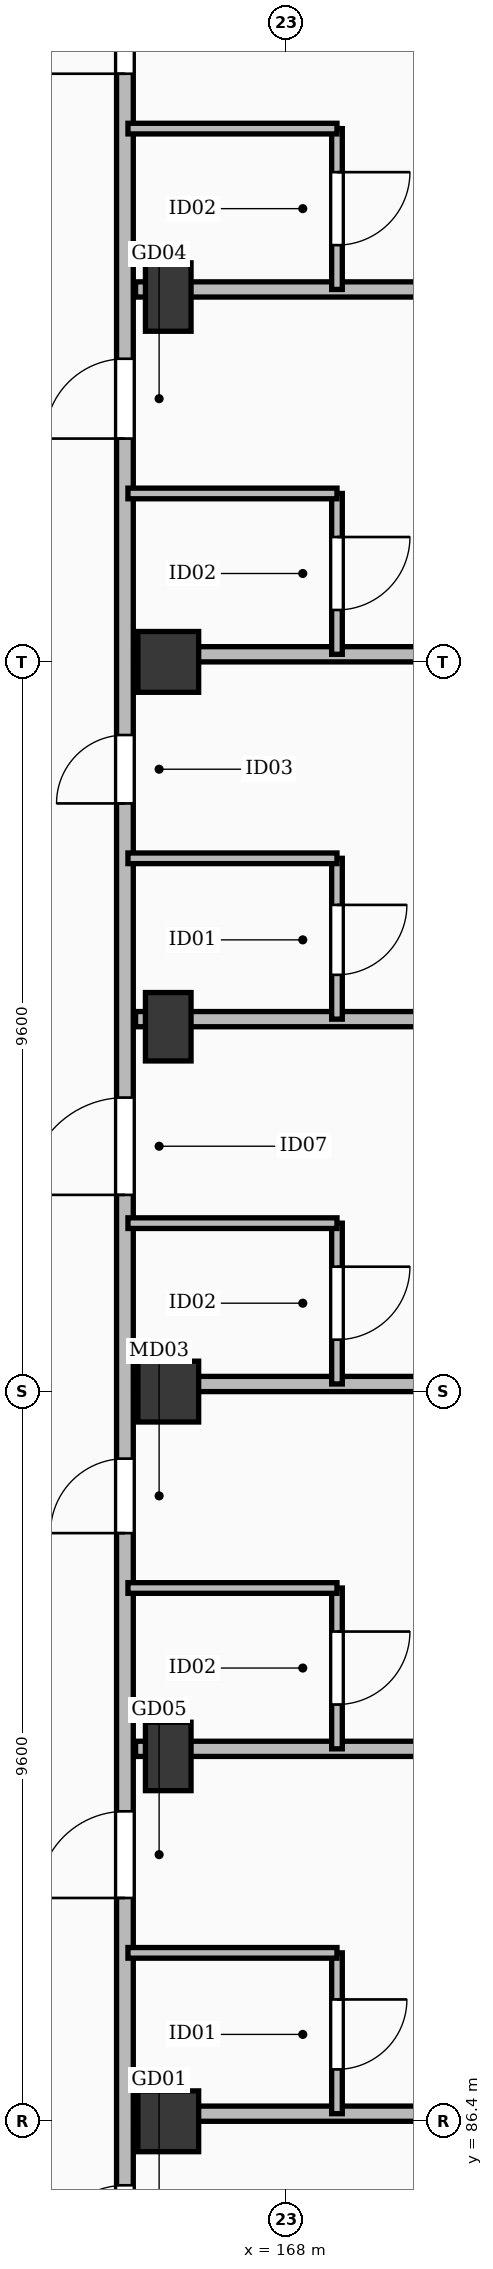
"""IFC4 building model, lengths in metres.
Left out: names, types, materials, properties, quantities, classifications, styles, units other than length and angle.
Written with IfcOpenShell. Run it as: python <this file> out.ifc"""

import sys

from ifc_helpers import new_model, si_unit, direction, frame, frame_2d, origin, origin_2d, place, context, subcontext, project, spatial, rectangle, extrude, element, fill, save


model = new_model("IFC4")
c1 = context("Model", 3, precision=1e-05, world=origin(), true_north=direction((0.0, 1.0)))
c2 = subcontext(c1, "Body", "Model", "MODEL_VIEW")
j1 = project(units=[si_unit("LENGTHUNIT", "METRE"), si_unit("PLANEANGLEUNIT", "RADIAN")], contexts=[c1])
p1 = place(None, origin())
s1 = spatial("IfcSite", under=j1, at=p1, CompositionType="ELEMENT")
p2 = place(p1, origin())
s2 = spatial("IfcBuilding", under=s1, at=p2, CompositionType="ELEMENT")
p3 = place(p2, frame((0.0, 0.0, 21.0)))
s3 = spatial("IfcBuildingStorey", under=s2, at=p3, CompositionType="ELEMENT", Elevation=21.0)
for number, where, z_axis, x_axis in (
    (1, (166.45, 86.4, 0.0), (0.0, 0.0, 1.0), (1.0, 0.0, 0.0)),
    (2, (166.45, 96.0, 0.0), (0.0, 0.0, 1.0), (1.0, 0.0, 0.0)),
    (3, (166.45, 105.6, 0.0), (0.0, 0.0, 1.0), (1.0, 0.0, 0.0)),
):
    element("IfcColumn", number, at=place(p3, frame(where, z_axis=z_axis, x_axis=x_axis)), inside=s3, PredefinedType="COLUMN", context=c2, shape_type="SweptSolid", body=[
        extrude(rectangle(XDim=0.8, YDim=0.8, at=origin_2d()), origin(), (0.0, 0.0, 1.0), 3.6),
    ])
for number, where, z_axis, x_axis in (
    (4, (166.45, 91.2, -0.26), (0.0, 0.0, 1.0), (1.0, 0.0, 0.0)),
    (5, (166.45, 100.8, -0.26), (0.0, 0.0, 1.0), (1.0, 0.0, 0.0)),
    (6, (166.45, 110.4, -0.26), (0.0, 0.0, 1.0), (1.0, 0.0, 0.0)),
):
    element("IfcColumn", number, at=place(p3, frame(where, z_axis=z_axis, x_axis=x_axis)), inside=s3, PredefinedType="COLUMN", context=c2, shape_type="SweptSolid", body=[
        extrude(rectangle(XDim=0.6, YDim=0.9, at=origin_2d()), origin(), (0.0, 0.0, 1.0), 3.86),
    ])
p4 = place(p3, frame((165.88, 65.4, 0.0), z_axis=(0.0, 0.0, 1.0), x_axis=(0.0, 1.0, 0.0)))
e7 = element("IfcWall", 7, at=p4, inside=s3, PredefinedType="PARTITIONING", context=c2, shape_type="SweptSolid", body=[
    extrude(rectangle(XDim=60.25, YDim=0.22, at=frame_2d((30.125, 0.0))), origin(), (0.0, 0.0, 1.0), 2.582),
])
p5 = place(p4, frame((4.388, 0.0, 0.0)))
e8 = element("IfcOpeningElement", 8, at=p5, cuts=e7, PredefinedType="OPENING", context=c2, shape_type="SweptSolid", body=[
    extrude(rectangle(XDim=1.28, YDim=2.16, at=frame_2d((0.64, 1.08))), frame((0.0, 0.122, 0.0), z_axis=(0.0, -1.0, 0.0), x_axis=(1.0, 0.0, 0.0)), (0.0, 0.0, 1.0), 0.244),
])
p6 = place(p4, frame((9.538, 0.0, 0.0)))
e9 = element("IfcOpeningElement", 9, at=p6, cuts=e7, PredefinedType="OPENING", context=c2, shape_type="SweptSolid", body=[
    extrude(rectangle(XDim=0.9, YDim=2.08, at=frame_2d((0.45, 1.04))), frame((0.0, 0.122, 0.0), z_axis=(0.0, -1.0, 0.0), x_axis=(1.0, 0.0, 0.0)), (0.0, 0.0, 1.0), 0.244),
])
p7 = place(p4, frame((14.338, 0.0, 0.0)))
e10 = element("IfcOpeningElement", 10, at=p7, cuts=e7, PredefinedType="OPENING", context=c2, shape_type="SweptSolid", body=[
    extrude(rectangle(XDim=1.05, YDim=2.22, at=frame_2d((0.525, 1.11))), frame((0.0, 0.122, 0.0), z_axis=(0.0, -1.0, 0.0), x_axis=(1.0, 0.0, 0.0)), (0.0, 0.0, 1.0), 0.244),
])
p8 = place(p4, frame((19.138, 0.0, 0.0)))
e11 = element("IfcOpeningElement", 11, at=p8, cuts=e7, PredefinedType="OPENING", context=c2, shape_type="SweptSolid", body=[
    extrude(rectangle(XDim=1.02, YDim=2.2, at=frame_2d((0.51, 1.1))), frame((0.0, 0.122, 0.0), z_axis=(0.0, -1.0, 0.0), x_axis=(1.0, 0.0, 0.0)), (0.0, 0.0, 1.0), 0.244),
])
p9 = place(p4, frame((23.938, 0.0, 0.0)))
e12 = element("IfcOpeningElement", 12, at=p9, cuts=e7, PredefinedType="OPENING", context=c2, shape_type="SweptSolid", body=[
    extrude(rectangle(XDim=1.14, YDim=2.26, at=frame_2d((0.57, 1.13))), frame((0.0, 0.122, 0.0), z_axis=(0.0, -1.0, 0.0), x_axis=(1.0, 0.0, 0.0)), (0.0, 0.0, 1.0), 0.244),
])
p10 = place(p4, frame((28.738, 0.0, 0.0)))
e13 = element("IfcOpeningElement", 13, at=p10, cuts=e7, PredefinedType="OPENING", context=c2, shape_type="SweptSolid", body=[
    extrude(rectangle(XDim=0.98, YDim=2.15, at=frame_2d((0.49, 1.075))), frame((0.0, 0.122, 0.0), z_axis=(0.0, -1.0, 0.0), x_axis=(1.0, 0.0, 0.0)), (0.0, 0.0, 1.0), 0.244),
])
p11 = place(p4, frame((33.188, 0.0, 0.0)))
e14 = element("IfcOpeningElement", 14, at=p11, cuts=e7, PredefinedType="OPENING", context=c2, shape_type="SweptSolid", body=[
    extrude(rectangle(XDim=1.28, YDim=2.16, at=frame_2d((0.64, 1.08))), frame((0.0, 0.122, 0.0), z_axis=(0.0, -1.0, 0.0), x_axis=(1.0, 0.0, 0.0)), (0.0, 0.0, 1.0), 0.244),
])
p12 = place(p4, frame((38.338, 0.0, 0.0)))
e15 = element("IfcOpeningElement", 15, at=p12, cuts=e7, PredefinedType="OPENING", context=c2, shape_type="SweptSolid", body=[
    extrude(rectangle(XDim=0.9, YDim=2.08, at=frame_2d((0.45, 1.04))), frame((0.0, 0.122, 0.0), z_axis=(0.0, -1.0, 0.0), x_axis=(1.0, 0.0, 0.0)), (0.0, 0.0, 1.0), 0.244),
])
p13 = place(p4, frame((43.138, 0.0, 0.0)))
e16 = element("IfcOpeningElement", 16, at=p13, cuts=e7, PredefinedType="OPENING", context=c2, shape_type="SweptSolid", body=[
    extrude(rectangle(XDim=1.05, YDim=2.22, at=frame_2d((0.525, 1.11))), frame((0.0, 0.122, 0.0), z_axis=(0.0, -1.0, 0.0), x_axis=(1.0, 0.0, 0.0)), (0.0, 0.0, 1.0), 0.244),
])
p14 = place(p4, frame((47.938, 0.0, 0.0)))
e17 = element("IfcOpeningElement", 17, at=p14, cuts=e7, PredefinedType="OPENING", context=c2, shape_type="SweptSolid", body=[
    extrude(rectangle(XDim=1.02, YDim=2.2, at=frame_2d((0.51, 1.1))), frame((0.0, 0.122, 0.0), z_axis=(0.0, -1.0, 0.0), x_axis=(1.0, 0.0, 0.0)), (0.0, 0.0, 1.0), 0.244),
])
p15 = place(p4, frame((52.738, 0.0, 0.0)))
e18 = element("IfcOpeningElement", 18, at=p15, cuts=e7, PredefinedType="OPENING", context=c2, shape_type="SweptSolid", body=[
    extrude(rectangle(XDim=1.14, YDim=2.26, at=frame_2d((0.57, 1.13))), frame((0.0, 0.122, 0.0), z_axis=(0.0, -1.0, 0.0), x_axis=(1.0, 0.0, 0.0)), (0.0, 0.0, 1.0), 0.244),
])
p16 = place(p4, frame((57.538, 0.0, 0.0)))
e19 = element("IfcOpeningElement", 19, at=p16, cuts=e7, PredefinedType="OPENING", context=c2, shape_type="SweptSolid", body=[
    extrude(rectangle(XDim=0.98, YDim=2.15, at=frame_2d((0.49, 1.075))), frame((0.0, 0.122, 0.0), z_axis=(0.0, -1.0, 0.0), x_axis=(1.0, 0.0, 0.0)), (0.0, 0.0, 1.0), 0.244),
])
p17 = place(p3, frame((166.02, 86.5, 0.0), z_axis=(0.0, 0.0, 1.0), x_axis=(1.0, 0.0, 0.0)))
e20 = element("IfcWall", 20, at=p17, inside=s3, PredefinedType="PARTITIONING", context=c2, shape_type="SweptSolid", body=[
    extrude(rectangle(XDim=13.23, YDim=0.2, at=frame_2d((6.615, 0.0))), origin(), (0.0, 0.0, 1.0), 2.582),
])
p18 = place(p3, frame((168.67, 86.5, 0.0), z_axis=(0.0, 0.0, 1.0), x_axis=(0.0, 1.0, 0.0)))
e21 = element("IfcWall", 21, at=p18, inside=s3, PredefinedType="PARTITIONING", context=c2, shape_type="SweptSolid", body=[
    extrude(rectangle(XDim=2.116, YDim=0.14, at=frame_2d((1.058, 0.0))), origin(), (0.0, 0.0, 1.0), 2.652),
])
p19 = place(p18, frame((0.583, 0.0, 0.0)))
e22 = element("IfcOpeningElement", 22, at=p19, cuts=e21, PredefinedType="OPENING", context=c2, shape_type="SweptSolid", body=[
    extrude(rectangle(XDim=0.92, YDim=2.1, at=frame_2d((0.46, 1.05))), frame((0.0, 0.082, 0.0), z_axis=(0.0, -1.0, 0.0), x_axis=(1.0, 0.0, 0.0)), (0.0, 0.0, 1.0), 0.164),
])
p20 = place(p3, frame((165.92, 88.616, 0.0), z_axis=(0.0, 0.0, 1.0), x_axis=(1.0, 0.0, 0.0)))
e23 = element("IfcWall", 23, at=p20, inside=s3, PredefinedType="PARTITIONING", context=c2, shape_type="SweptSolid", body=[
    extrude(rectangle(XDim=2.75, YDim=0.14, at=frame_2d((1.375, 0.0))), origin(), (0.0, 0.0, 1.0), 2.652),
])
p21 = place(p3, frame((166.02, 91.3, 0.0), z_axis=(0.0, 0.0, 1.0), x_axis=(1.0, 0.0, 0.0)))
e24 = element("IfcWall", 24, at=p21, inside=s3, PredefinedType="PARTITIONING", context=c2, shape_type="SweptSolid", body=[
    extrude(rectangle(XDim=13.23, YDim=0.2, at=frame_2d((6.615, 0.0))), origin(), (0.0, 0.0, 1.0), 2.582),
])
p22 = place(p3, frame((168.67, 91.3, 0.0), z_axis=(0.0, 0.0, 1.0), x_axis=(0.0, 1.0, 0.0)))
e25 = element("IfcWall", 25, at=p22, inside=s3, PredefinedType="PARTITIONING", context=c2, shape_type="SweptSolid", body=[
    extrude(rectangle(XDim=2.116, YDim=0.14, at=frame_2d((1.058, 0.0))), origin(), (0.0, 0.0, 1.0), 2.652),
])
p23 = place(p22, frame((0.583, 0.0, 0.0)))
e26 = element("IfcOpeningElement", 26, at=p23, cuts=e25, PredefinedType="OPENING", context=c2, shape_type="SweptSolid", body=[
    extrude(rectangle(XDim=0.96, YDim=2.12, at=frame_2d((0.48, 1.06))), frame((0.0, 0.082, 0.0), z_axis=(0.0, -1.0, 0.0), x_axis=(1.0, 0.0, 0.0)), (0.0, 0.0, 1.0), 0.164),
])
p24 = place(p3, frame((165.92, 93.416, 0.0), z_axis=(0.0, 0.0, 1.0), x_axis=(1.0, 0.0, 0.0)))
e27 = element("IfcWall", 27, at=p24, inside=s3, PredefinedType="PARTITIONING", context=c2, shape_type="SweptSolid", body=[
    extrude(rectangle(XDim=2.75, YDim=0.14, at=frame_2d((1.375, 0.0))), origin(), (0.0, 0.0, 1.0), 2.652),
])
p25 = place(p3, frame((166.02, 96.1, 0.0), z_axis=(0.0, 0.0, 1.0), x_axis=(1.0, 0.0, 0.0)))
e28 = element("IfcWall", 28, at=p25, inside=s3, PredefinedType="PARTITIONING", context=c2, shape_type="SweptSolid", body=[
    extrude(rectangle(XDim=13.23, YDim=0.2, at=frame_2d((6.615, 0.0))), origin(), (0.0, 0.0, 1.0), 2.582),
])
p26 = place(p3, frame((168.67, 96.1, 0.0), z_axis=(0.0, 0.0, 1.0), x_axis=(0.0, 1.0, 0.0)))
e29 = element("IfcWall", 29, at=p26, inside=s3, PredefinedType="PARTITIONING", context=c2, shape_type="SweptSolid", body=[
    extrude(rectangle(XDim=2.116, YDim=0.14, at=frame_2d((1.058, 0.0))), origin(), (0.0, 0.0, 1.0), 2.652),
])
p27 = place(p26, frame((0.583, 0.0, 0.0)))
e30 = element("IfcOpeningElement", 30, at=p27, cuts=e29, PredefinedType="OPENING", context=c2, shape_type="SweptSolid", body=[
    extrude(rectangle(XDim=0.96, YDim=2.12, at=frame_2d((0.48, 1.06))), frame((0.0, 0.082, 0.0), z_axis=(0.0, -1.0, 0.0), x_axis=(1.0, 0.0, 0.0)), (0.0, 0.0, 1.0), 0.164),
])
p28 = place(p3, frame((165.92, 98.216, 0.0), z_axis=(0.0, 0.0, 1.0), x_axis=(1.0, 0.0, 0.0)))
e31 = element("IfcWall", 31, at=p28, inside=s3, PredefinedType="PARTITIONING", context=c2, shape_type="SweptSolid", body=[
    extrude(rectangle(XDim=2.75, YDim=0.14, at=frame_2d((1.375, 0.0))), origin(), (0.0, 0.0, 1.0), 2.652),
])
p29 = place(p3, frame((166.02, 100.9, 0.0), z_axis=(0.0, 0.0, 1.0), x_axis=(1.0, 0.0, 0.0)))
e32 = element("IfcWall", 32, at=p29, inside=s3, PredefinedType="PARTITIONING", context=c2, shape_type="SweptSolid", body=[
    extrude(rectangle(XDim=13.23, YDim=0.2, at=frame_2d((6.615, 0.0))), origin(), (0.0, 0.0, 1.0), 2.582),
])
p30 = place(p3, frame((168.67, 100.9, 0.0), z_axis=(0.0, 0.0, 1.0), x_axis=(0.0, 1.0, 0.0)))
e33 = element("IfcWall", 33, at=p30, inside=s3, PredefinedType="PARTITIONING", context=c2, shape_type="SweptSolid", body=[
    extrude(rectangle(XDim=2.116, YDim=0.14, at=frame_2d((1.058, 0.0))), origin(), (0.0, 0.0, 1.0), 2.652),
])
p31 = place(p30, frame((0.583, 0.0, 0.0)))
e34 = element("IfcOpeningElement", 34, at=p31, cuts=e33, PredefinedType="OPENING", context=c2, shape_type="SweptSolid", body=[
    extrude(rectangle(XDim=0.92, YDim=2.1, at=frame_2d((0.46, 1.05))), frame((0.0, 0.082, 0.0), z_axis=(0.0, -1.0, 0.0), x_axis=(1.0, 0.0, 0.0)), (0.0, 0.0, 1.0), 0.164),
])
p32 = place(p3, frame((165.92, 103.016, 0.0), z_axis=(0.0, 0.0, 1.0), x_axis=(1.0, 0.0, 0.0)))
e35 = element("IfcWall", 35, at=p32, inside=s3, PredefinedType="PARTITIONING", context=c2, shape_type="SweptSolid", body=[
    extrude(rectangle(XDim=2.75, YDim=0.14, at=frame_2d((1.375, 0.0))), origin(), (0.0, 0.0, 1.0), 2.652),
])
p33 = place(p3, frame((166.02, 105.7, 0.0), z_axis=(0.0, 0.0, 1.0), x_axis=(1.0, 0.0, 0.0)))
e36 = element("IfcWall", 36, at=p33, inside=s3, PredefinedType="PARTITIONING", context=c2, shape_type="SweptSolid", body=[
    extrude(rectangle(XDim=13.23, YDim=0.2, at=frame_2d((6.615, 0.0))), origin(), (0.0, 0.0, 1.0), 2.582),
])
p34 = place(p3, frame((168.67, 105.7, 0.0), z_axis=(0.0, 0.0, 1.0), x_axis=(0.0, 1.0, 0.0)))
e37 = element("IfcWall", 37, at=p34, inside=s3, PredefinedType="PARTITIONING", context=c2, shape_type="SweptSolid", body=[
    extrude(rectangle(XDim=2.116, YDim=0.14, at=frame_2d((1.058, 0.0))), origin(), (0.0, 0.0, 1.0), 2.652),
])
p35 = place(p34, frame((0.583, 0.0, 0.0)))
e38 = element("IfcOpeningElement", 38, at=p35, cuts=e37, PredefinedType="OPENING", context=c2, shape_type="SweptSolid", body=[
    extrude(rectangle(XDim=0.96, YDim=2.12, at=frame_2d((0.48, 1.06))), frame((0.0, 0.082, 0.0), z_axis=(0.0, -1.0, 0.0), x_axis=(1.0, 0.0, 0.0)), (0.0, 0.0, 1.0), 0.164),
])
p36 = place(p3, frame((165.92, 107.816, 0.0), z_axis=(0.0, 0.0, 1.0), x_axis=(1.0, 0.0, 0.0)))
e39 = element("IfcWall", 39, at=p36, inside=s3, PredefinedType="PARTITIONING", context=c2, shape_type="SweptSolid", body=[
    extrude(rectangle(XDim=2.75, YDim=0.14, at=frame_2d((1.375, 0.0))), origin(), (0.0, 0.0, 1.0), 2.652),
])
p37 = place(p3, frame((166.02, 110.5, 0.0), z_axis=(0.0, 0.0, 1.0), x_axis=(1.0, 0.0, 0.0)))
e40 = element("IfcWall", 40, at=p37, inside=s3, PredefinedType="PARTITIONING", context=c2, shape_type="SweptSolid", body=[
    extrude(rectangle(XDim=13.23, YDim=0.2, at=frame_2d((6.615, 0.0))), origin(), (0.0, 0.0, 1.0), 2.582),
])
p38 = place(p3, frame((168.67, 110.5, 0.0), z_axis=(0.0, 0.0, 1.0), x_axis=(0.0, 1.0, 0.0)))
e41 = element("IfcWall", 41, at=p38, inside=s3, PredefinedType="PARTITIONING", context=c2, shape_type="SweptSolid", body=[
    extrude(rectangle(XDim=2.116, YDim=0.14, at=frame_2d((1.058, 0.0))), origin(), (0.0, 0.0, 1.0), 2.652),
])
p39 = place(p38, frame((0.583, 0.0, 0.0)))
e42 = element("IfcOpeningElement", 42, at=p39, cuts=e41, PredefinedType="OPENING", context=c2, shape_type="SweptSolid", body=[
    extrude(rectangle(XDim=0.96, YDim=2.12, at=frame_2d((0.48, 1.06))), frame((0.0, 0.082, 0.0), z_axis=(0.0, -1.0, 0.0), x_axis=(1.0, 0.0, 0.0)), (0.0, 0.0, 1.0), 0.164),
])
p40 = place(p3, frame((165.92, 112.616, 0.0), z_axis=(0.0, 0.0, 1.0), x_axis=(1.0, 0.0, 0.0)))
e43 = element("IfcWall", 43, at=p40, inside=s3, PredefinedType="PARTITIONING", context=c2, shape_type="SweptSolid", body=[
    extrude(rectangle(XDim=2.75, YDim=0.14, at=frame_2d((1.375, 0.0))), origin(), (0.0, 0.0, 1.0), 2.652),
])
p41 = place(p8, origin())
e44 = element("IfcDoor", 44, at=p41, inside=s3, OperationType="SINGLE_SWING_LEFT", PredefinedType="DOOR", context=c2, shape_type="SweptSolid", body=[
    extrude(rectangle(XDim=1.02, YDim=2.2, at=frame_2d((0.51, 1.1))), frame((0.0, 0.025, 0.0), z_axis=(0.0, -1.0, 0.0), x_axis=(1.0, 0.0, 0.0)), (0.0, 0.0, 1.0), 0.05),
])
fill(e11, e44)
p42 = place(p9, origin())
e45 = element("IfcDoor", 45, at=p42, inside=s3, OperationType="SINGLE_SWING_LEFT", PredefinedType="DOOR", context=c2, shape_type="SweptSolid", body=[
    extrude(rectangle(XDim=1.14, YDim=2.26, at=frame_2d((0.57, 1.13))), frame((0.0, 0.025, 0.0), z_axis=(0.0, -1.0, 0.0), x_axis=(1.0, 0.0, 0.0)), (0.0, 0.0, 1.0), 0.05),
])
fill(e12, e45)
p43 = place(p19, frame((0.92, 0.0, 0.0), z_axis=(0.0, 0.0, 1.0), x_axis=(-1.0, 0.0, 0.0)))
e46 = element("IfcDoor", 46, at=p43, inside=s3, OperationType="SINGLE_SWING_RIGHT", PredefinedType="DOOR", context=c2, shape_type="SweptSolid", body=[
    extrude(rectangle(XDim=0.92, YDim=2.1, at=frame_2d((0.46, 1.05))), frame((0.0, 0.025, 0.0), z_axis=(0.0, -1.0, 0.0), x_axis=(1.0, 0.0, 0.0)), (0.0, 0.0, 1.0), 0.05),
])
fill(e22, e46)
p44 = place(p10, origin())
e47 = element("IfcDoor", 47, at=p44, inside=s3, OperationType="SINGLE_SWING_LEFT", PredefinedType="DOOR", context=c2, shape_type="SweptSolid", body=[
    extrude(rectangle(XDim=0.98, YDim=2.15, at=frame_2d((0.49, 1.075))), frame((0.0, 0.025, 0.0), z_axis=(0.0, -1.0, 0.0), x_axis=(1.0, 0.0, 0.0)), (0.0, 0.0, 1.0), 0.05),
])
fill(e13, e47)
p45 = place(p23, frame((0.96, 0.0, 0.0), z_axis=(0.0, 0.0, 1.0), x_axis=(-1.0, 0.0, 0.0)))
e48 = element("IfcDoor", 48, at=p45, inside=s3, OperationType="SINGLE_SWING_RIGHT", PredefinedType="DOOR", context=c2, shape_type="SweptSolid", body=[
    extrude(rectangle(XDim=0.96, YDim=2.12, at=frame_2d((0.48, 1.06))), frame((0.0, 0.025, 0.0), z_axis=(0.0, -1.0, 0.0), x_axis=(1.0, 0.0, 0.0)), (0.0, 0.0, 1.0), 0.05),
])
fill(e26, e48)
p46 = place(p11, origin())
e49 = element("IfcDoor", 49, at=p46, inside=s3, OperationType="SINGLE_SWING_LEFT", PredefinedType="DOOR", context=c2, shape_type="SweptSolid", body=[
    extrude(rectangle(XDim=1.28, YDim=2.16, at=frame_2d((0.64, 1.08))), frame((0.0, 0.025, 0.0), z_axis=(0.0, -1.0, 0.0), x_axis=(1.0, 0.0, 0.0)), (0.0, 0.0, 1.0), 0.05),
])
fill(e14, e49)
p47 = place(p27, frame((0.96, 0.0, 0.0), z_axis=(0.0, 0.0, 1.0), x_axis=(-1.0, 0.0, 0.0)))
e50 = element("IfcDoor", 50, at=p47, inside=s3, OperationType="SINGLE_SWING_RIGHT", PredefinedType="DOOR", context=c2, shape_type="SweptSolid", body=[
    extrude(rectangle(XDim=0.96, YDim=2.12, at=frame_2d((0.48, 1.06))), frame((0.0, 0.025, 0.0), z_axis=(0.0, -1.0, 0.0), x_axis=(1.0, 0.0, 0.0)), (0.0, 0.0, 1.0), 0.05),
])
fill(e30, e50)
p48 = place(p12, origin())
e51 = element("IfcDoor", 51, at=p48, inside=s3, OperationType="SINGLE_SWING_LEFT", PredefinedType="DOOR", context=c2, shape_type="SweptSolid", body=[
    extrude(rectangle(XDim=0.9, YDim=2.08, at=frame_2d((0.45, 1.04))), frame((0.0, 0.025, 0.0), z_axis=(0.0, -1.0, 0.0), x_axis=(1.0, 0.0, 0.0)), (0.0, 0.0, 1.0), 0.05),
])
fill(e15, e51)
p49 = place(p31, frame((0.92, 0.0, 0.0), z_axis=(0.0, 0.0, 1.0), x_axis=(-1.0, 0.0, 0.0)))
e52 = element("IfcDoor", 52, at=p49, inside=s3, OperationType="SINGLE_SWING_RIGHT", PredefinedType="DOOR", context=c2, shape_type="SweptSolid", body=[
    extrude(rectangle(XDim=0.92, YDim=2.1, at=frame_2d((0.46, 1.05))), frame((0.0, 0.025, 0.0), z_axis=(0.0, -1.0, 0.0), x_axis=(1.0, 0.0, 0.0)), (0.0, 0.0, 1.0), 0.05),
])
fill(e34, e52)
p50 = place(p13, origin())
e53 = element("IfcDoor", 53, at=p50, inside=s3, OperationType="SINGLE_SWING_LEFT", PredefinedType="DOOR", context=c2, shape_type="SweptSolid", body=[
    extrude(rectangle(XDim=1.05, YDim=2.22, at=frame_2d((0.525, 1.11))), frame((0.0, 0.025, 0.0), z_axis=(0.0, -1.0, 0.0), x_axis=(1.0, 0.0, 0.0)), (0.0, 0.0, 1.0), 0.05),
])
fill(e16, e53)
p51 = place(p35, frame((0.96, 0.0, 0.0), z_axis=(0.0, 0.0, 1.0), x_axis=(-1.0, 0.0, 0.0)))
e54 = element("IfcDoor", 54, at=p51, inside=s3, OperationType="SINGLE_SWING_RIGHT", PredefinedType="DOOR", context=c2, shape_type="SweptSolid", body=[
    extrude(rectangle(XDim=0.96, YDim=2.12, at=frame_2d((0.48, 1.06))), frame((0.0, 0.025, 0.0), z_axis=(0.0, -1.0, 0.0), x_axis=(1.0, 0.0, 0.0)), (0.0, 0.0, 1.0), 0.05),
])
fill(e38, e54)
p52 = place(p14, origin())
e55 = element("IfcDoor", 55, at=p52, inside=s3, OperationType="SINGLE_SWING_LEFT", PredefinedType="DOOR", context=c2, shape_type="SweptSolid", body=[
    extrude(rectangle(XDim=1.02, YDim=2.2, at=frame_2d((0.51, 1.1))), frame((0.0, 0.025, 0.0), z_axis=(0.0, -1.0, 0.0), x_axis=(1.0, 0.0, 0.0)), (0.0, 0.0, 1.0), 0.05),
])
fill(e17, e55)
p53 = place(p39, frame((0.96, 0.0, 0.0), z_axis=(0.0, 0.0, 1.0), x_axis=(-1.0, 0.0, 0.0)))
e56 = element("IfcDoor", 56, at=p53, inside=s3, OperationType="SINGLE_SWING_RIGHT", PredefinedType="DOOR", context=c2, shape_type="SweptSolid", body=[
    extrude(rectangle(XDim=0.96, YDim=2.12, at=frame_2d((0.48, 1.06))), frame((0.0, 0.025, 0.0), z_axis=(0.0, -1.0, 0.0), x_axis=(1.0, 0.0, 0.0)), (0.0, 0.0, 1.0), 0.05),
])
fill(e42, e56)
save(model, sys.argv[1])
